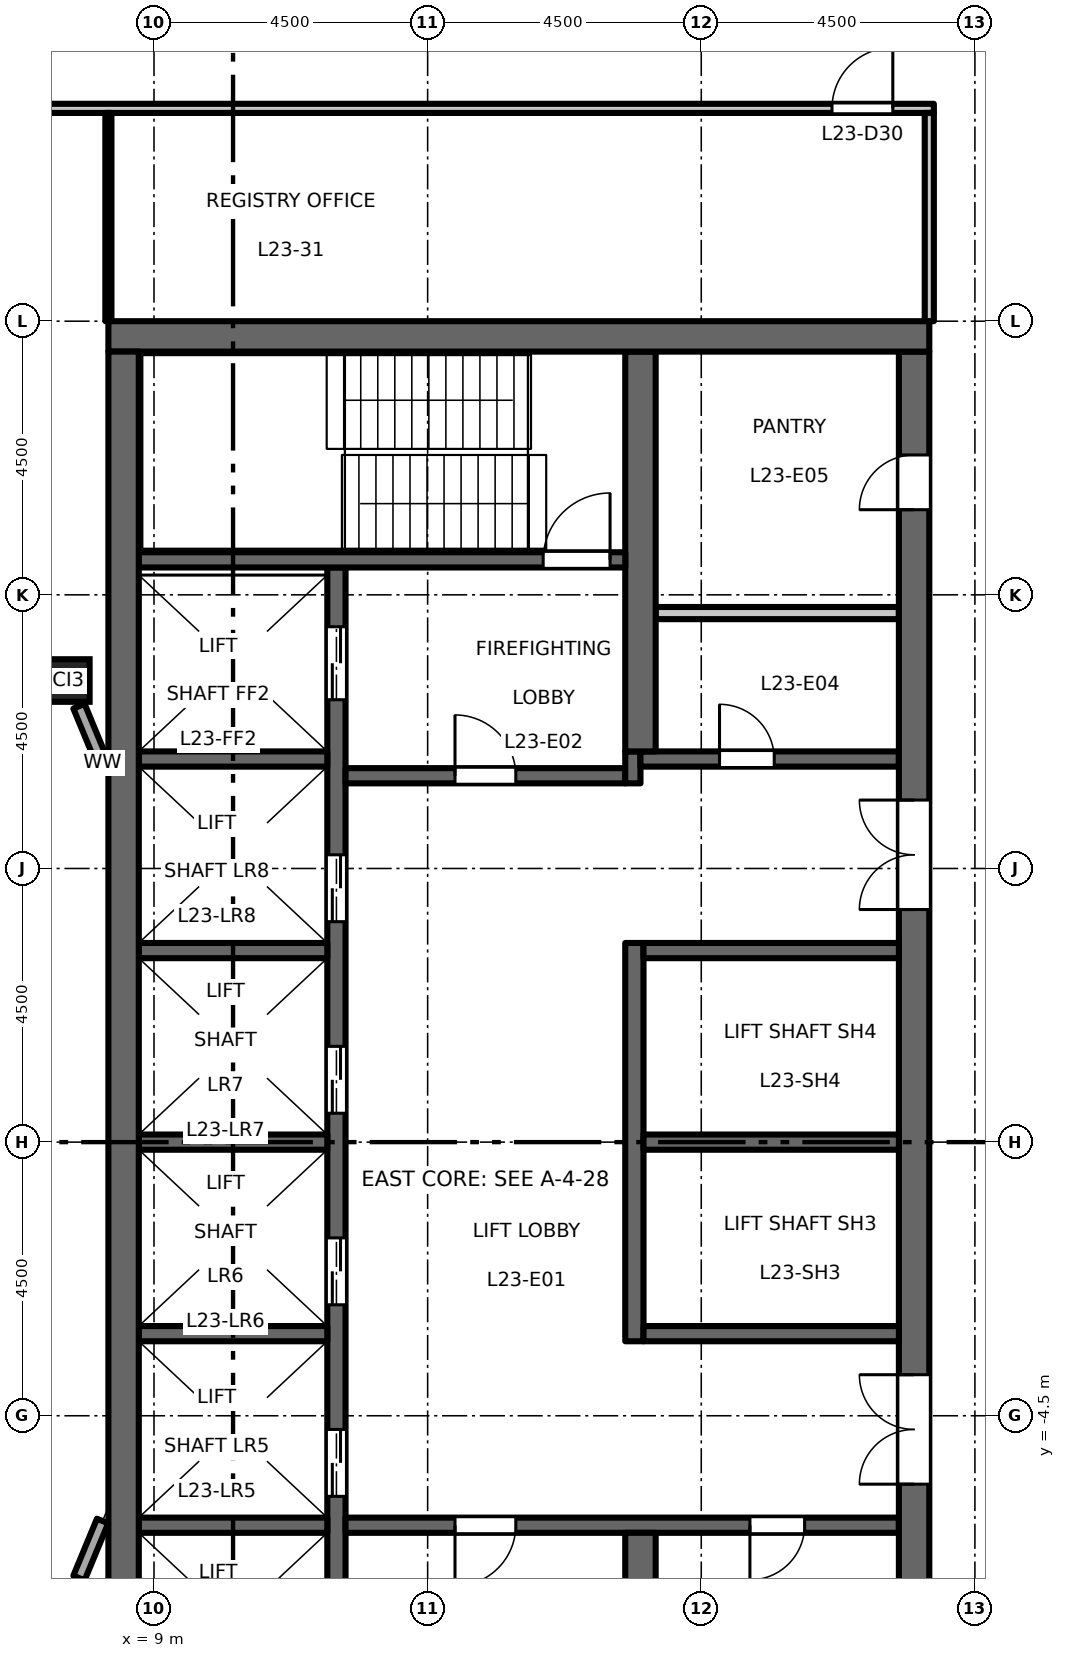
"""IFC4 building model, lengths in metres.
Left out: names, types, materials, properties, quantities, classifications, styles, units other than length and angle.
Written with IfcOpenShell. Run it as: python <this file> out.ifc"""

import sys

from ifc_helpers import new_model, si_unit, direction, frame, frame_2d, origin, origin_2d, place, context, subcontext, project, spatial, rectangle, hollow_rectangle, extrude, element, fill, save


model = new_model("IFC4")
c1 = context("Model", 3, precision=1e-05, world=origin(), true_north=direction((0.0, 1.0)))
c2 = subcontext(c1, "Body", "Model", "MODEL_VIEW")
j1 = project(units=[si_unit("LENGTHUNIT", "METRE"), si_unit("PLANEANGLEUNIT", "RADIAN")], contexts=[c1])
p1 = place(None, origin())
s1 = spatial("IfcSite", under=j1, at=p1, CompositionType="ELEMENT")
p2 = place(p1, origin())
s2 = spatial("IfcBuilding", under=s1, at=p2, CompositionType="ELEMENT")
p3 = place(p2, frame((0.0, 0.0, 109.2)))
s3 = spatial("IfcBuildingStorey", under=s2, at=p3, CompositionType="ELEMENT", Elevation=109.2)
p4 = place(p3, frame((7.591, 7.591, 0.0), z_axis=(0.0, 0.0, 1.0), x_axis=(1.0, 0.0, 0.0)))
e1 = element("IfcColumn", 1, at=p4, inside=s3, PredefinedType="COLUMN", context=c2, shape_type="SweptSolid", body=[
    extrude(hollow_rectangle(XDim=0.7, YDim=0.7, WallThickness=0.04, at=origin_2d()), origin(), (0.0, 0.0, 1.0), 4.5),
])
p5 = place(p3, frame((12.0, -9.45, 0.0), z_axis=(0.0, 0.0, 1.0), x_axis=(0.0, 1.0, 0.0)))
e2 = element("IfcWall", 2, at=p5, inside=s3, PredefinedType="SHEAR", context=c2, shape_type="SweptSolid", body=[
    extrude(rectangle(XDim=18.9, YDim=0.3, at=frame_2d((9.45, 0.0))), origin(), (0.0, 0.0, 1.0), 4.35),
])
p6 = place(p5, frame((3.625, 0.0, 0.0)))
e3 = element("IfcOpeningElement", 3, at=p6, cuts=e2, PredefinedType="OPENING", context=c2, shape_type="SweptSolid", body=[
    extrude(rectangle(XDim=1.1, YDim=2.1, at=frame_2d((0.55, 1.05))), frame((0.0, 0.16, 0.0), z_axis=(0.0, -1.0, 0.0), x_axis=(1.0, 0.0, 0.0)), (0.0, 0.0, 1.0), 0.32),
])
p7 = place(p5, frame((6.775, 0.0, 0.0)))
e4 = element("IfcOpeningElement", 4, at=p7, cuts=e2, PredefinedType="OPENING", context=c2, shape_type="SweptSolid", body=[
    extrude(rectangle(XDim=1.1, YDim=2.1, at=frame_2d((0.55, 1.05))), frame((0.0, 0.16, 0.0), z_axis=(0.0, -1.0, 0.0), x_axis=(1.0, 0.0, 0.0)), (0.0, 0.0, 1.0), 0.32),
])
p8 = place(p5, frame((9.925, 0.0, 0.0)))
e5 = element("IfcOpeningElement", 5, at=p8, cuts=e2, PredefinedType="OPENING", context=c2, shape_type="SweptSolid", body=[
    extrude(rectangle(XDim=1.1, YDim=2.1, at=frame_2d((0.55, 1.05))), frame((0.0, 0.16, 0.0), z_axis=(0.0, -1.0, 0.0), x_axis=(1.0, 0.0, 0.0)), (0.0, 0.0, 1.0), 0.32),
])
p9 = place(p5, frame((13.075, 0.0, 0.0)))
e6 = element("IfcOpeningElement", 6, at=p9, cuts=e2, PredefinedType="OPENING", context=c2, shape_type="SweptSolid", body=[
    extrude(rectangle(XDim=1.1, YDim=2.1, at=frame_2d((0.55, 1.05))), frame((0.0, 0.16, 0.0), z_axis=(0.0, -1.0, 0.0), x_axis=(1.0, 0.0, 0.0)), (0.0, 0.0, 1.0), 0.32),
])
p10 = place(p5, frame((16.725, 0.0, 0.0)))
e7 = element("IfcOpeningElement", 7, at=p10, cuts=e2, PredefinedType="OPENING", context=c2, shape_type="SweptSolid", body=[
    extrude(rectangle(XDim=1.2, YDim=2.1, at=frame_2d((0.6, 1.05))), frame((0.0, 0.16, 0.0), z_axis=(0.0, -1.0, 0.0), x_axis=(1.0, 0.0, 0.0)), (0.0, 0.0, 1.0), 0.32),
])
p11 = place(p5, frame((0.975, 0.0, 0.0)))
e8 = element("IfcOpeningElement", 8, at=p11, cuts=e2, PredefinedType="OPENING", context=c2, shape_type="SweptSolid", body=[
    extrude(rectangle(XDim=1.2, YDim=2.1, at=frame_2d((0.6, 1.05))), frame((0.0, 0.16, 0.0), z_axis=(0.0, -1.0, 0.0), x_axis=(1.0, 0.0, 0.0)), (0.0, 0.0, 1.0), 0.32),
])
p12 = place(p3, frame((12.15, 6.025, 0.0), z_axis=(0.0, 0.0, 1.0), x_axis=(1.0, 0.0, 0.0)))
e9 = element("IfcWall", 9, at=p12, inside=s3, PredefinedType="SHEAR", context=c2, shape_type="SweptSolid", body=[
    extrude(rectangle(XDim=4.6, YDim=0.25, at=frame_2d((2.3, 0.0))), origin(), (0.0, 0.0, 1.0), 4.35),
])
p13 = place(p12, frame((1.8, 0.0, 0.0)))
e10 = element("IfcOpeningElement", 10, at=p13, cuts=e9, PredefinedType="OPENING", context=c2, shape_type="SweptSolid", body=[
    extrude(rectangle(XDim=1.0, YDim=2.1, at=frame_2d((0.5, 1.05))), frame((0.0, 0.135, 0.0), z_axis=(0.0, -1.0, 0.0), x_axis=(1.0, 0.0, 0.0)), (0.0, 0.0, 1.0), 0.27),
])
p14 = place(p3, frame((16.875, 5.9, 0.0), z_axis=(0.0, 0.0, 1.0), x_axis=(0.0, 1.0, 0.0)))
e11 = element("IfcWall", 11, at=p14, inside=s3, PredefinedType="SHEAR", context=c2, shape_type="SweptSolid", body=[
    extrude(rectangle(XDim=0.525, YDim=0.25, at=frame_2d((0.263, 0.0))), origin(), (0.0, 0.0, 1.0), 4.35),
])
p15 = place(p3, frame((17.0, 6.3, 0.0), z_axis=(0.0, 0.0, 1.0), x_axis=(1.0, 0.0, 0.0)))
e12 = element("IfcWall", 12, at=p15, inside=s3, PredefinedType="SHEAR", context=c2, shape_type="SweptSolid", body=[
    extrude(rectangle(XDim=4.25, YDim=0.25, at=frame_2d((2.125, 0.0))), origin(), (0.0, 0.0, 1.0), 4.35),
])
p16 = place(p15, frame((1.3, 0.0, 0.0)))
e13 = element("IfcOpeningElement", 13, at=p16, cuts=e12, PredefinedType="OPENING", context=c2, shape_type="SweptSolid", body=[
    extrude(rectangle(XDim=0.9, YDim=2.1, at=frame_2d((0.45, 1.05))), frame((0.0, 0.135, 0.0), z_axis=(0.0, -1.0, 0.0), x_axis=(1.0, 0.0, 0.0)), (0.0, 0.0, 1.0), 0.27),
])
p17 = place(p3, frame((12.15, -6.3, 0.0), z_axis=(0.0, 0.0, 1.0), x_axis=(1.0, 0.0, 0.0)))
e14 = element("IfcWall", 14, at=p17, inside=s3, PredefinedType="SHEAR", context=c2, shape_type="SweptSolid", body=[
    extrude(rectangle(XDim=9.1, YDim=0.25, at=frame_2d((4.55, 0.0))), origin(), (0.0, 0.0, 1.0), 4.35),
])
p18 = place(p17, frame((1.8, 0.0, 0.0)))
e15 = element("IfcOpeningElement", 15, at=p18, cuts=e14, PredefinedType="OPENING", context=c2, shape_type="SweptSolid", body=[
    extrude(rectangle(XDim=1.0, YDim=2.1, at=frame_2d((0.5, 1.05))), frame((0.0, 0.135, 0.0), z_axis=(0.0, -1.0, 0.0), x_axis=(1.0, 0.0, 0.0)), (0.0, 0.0, 1.0), 0.27),
])
p19 = place(p17, frame((6.65, 0.0, 0.0)))
e16 = element("IfcOpeningElement", 16, at=p19, cuts=e14, PredefinedType="OPENING", context=c2, shape_type="SweptSolid", body=[
    extrude(rectangle(XDim=0.9, YDim=2.1, at=frame_2d((0.45, 1.05))), frame((0.0, 0.135, 0.0), z_axis=(0.0, -1.0, 0.0), x_axis=(1.0, 0.0, 0.0)), (0.0, 0.0, 1.0), 0.27),
])
p20 = place(p3, frame((21.5, -13.0, 0.0), z_axis=(0.0, 0.0, 1.0), x_axis=(0.0, 1.0, 0.0)))
e17 = element("IfcWall", 17, at=p20, inside=s3, PredefinedType="SHEAR", context=c2, shape_type="SweptSolid", body=[
    extrude(rectangle(XDim=26.0, YDim=0.5, at=frame_2d((13.0, 0.0))), origin(), (0.0, 0.0, 1.0), 4.35),
])
p21 = place(p20, frame((16.825, 0.0, 0.0)))
e18 = element("IfcOpeningElement", 18, at=p21, cuts=e17, PredefinedType="OPENING", context=c2, shape_type="SweptSolid", body=[
    extrude(rectangle(XDim=1.8, YDim=2.1, at=frame_2d((0.9, 1.05))), frame((0.0, 0.26, 0.0), z_axis=(0.0, -1.0, 0.0), x_axis=(1.0, 0.0, 0.0)), (0.0, 0.0, 1.0), 0.52),
])
p22 = place(p20, frame((7.375, 0.0, 0.0)))
e19 = element("IfcOpeningElement", 19, at=p22, cuts=e17, PredefinedType="OPENING", context=c2, shape_type="SweptSolid", body=[
    extrude(rectangle(XDim=1.8, YDim=2.1, at=frame_2d((0.9, 1.05))), frame((0.0, 0.26, 0.0), z_axis=(0.0, -1.0, 0.0), x_axis=(1.0, 0.0, 0.0)), (0.0, 0.0, 1.0), 0.52),
])
p23 = place(p20, frame((23.4, 0.0, 0.0)))
e20 = element("IfcOpeningElement", 20, at=p23, cuts=e17, PredefinedType="OPENING", context=c2, shape_type="SweptSolid", body=[
    extrude(rectangle(XDim=0.9, YDim=2.1, at=frame_2d((0.45, 1.05))), frame((0.0, 0.26, 0.0), z_axis=(0.0, -1.0, 0.0), x_axis=(1.0, 0.0, 0.0)), (0.0, 0.0, 1.0), 0.52),
])
p24 = place(p3, frame((17.25, 8.7, 0.0), z_axis=(0.0, 0.0, 1.0), x_axis=(1.0, 0.0, 0.0)))
e21 = element("IfcWall", 21, at=p24, inside=s3, PredefinedType="PARTITIONING", context=c2, shape_type="SweptSolid", body=[
    extrude(rectangle(XDim=4.0, YDim=0.2, at=frame_2d((2.0, 0.0))), origin(), (0.0, 0.0, 1.0), 4.35),
])
p25 = place(p3, frame((16.9, -3.275, 0.0), z_axis=(0.0, 0.0, 1.0), x_axis=(0.0, 1.0, 0.0)))
e22 = element("IfcWall", 22, at=p25, inside=s3, PredefinedType="SHEAR", context=c2, shape_type="SweptSolid", body=[
    extrude(rectangle(XDim=6.55, YDim=0.3, at=frame_2d((3.275, 0.0))), origin(), (0.0, 0.0, 1.0), 4.35),
])
for number, where, z_axis, x_axis in (
    (23, (17.05, 0.0, 0.0), (0.0, 0.0, 1.0), (1.0, 0.0, 0.0)),
    (24, (17.05, 3.15, 0.0), (0.0, 0.0, 1.0), (1.0, 0.0, 0.0)),
    (25, (17.05, -3.15, 0.0), (0.0, 0.0, 1.0), (1.0, 0.0, 0.0)),
):
    element("IfcWall", number, at=place(p3, frame(where, z_axis=z_axis, x_axis=x_axis)), inside=s3, PredefinedType="SHEAR", context=c2, shape_type="SweptSolid", body=[
        extrude(rectangle(XDim=4.2, YDim=0.25, at=frame_2d((2.1, 0.0))), origin(), (0.0, 0.0, 1.0), 4.35),
    ])
for number, where, z_axis, x_axis in (
    (26, (17.0, 6.425, 0.0), (0.0, 0.0, 1.0), (0.0, 1.0, 0.0)),
    (27, (17.0, -13.0, 0.0), (0.0, 0.0, 1.0), (0.0, 1.0, 0.0)),
):
    element("IfcWall", number, at=place(p3, frame(where, z_axis=z_axis, x_axis=x_axis)), inside=s3, PredefinedType="SHEAR", context=c2, shape_type="SweptSolid", body=[
        extrude(rectangle(XDim=6.575, YDim=0.5, at=frame_2d((3.288, 0.0))), origin(), (0.0, 0.0, 1.0), 4.35),
    ])
for number, where, z_axis, x_axis in (
    (28, (8.75, 0.0, 0.0), (0.0, 0.0, 1.0), (1.0, 0.0, 0.0)),
    (29, (8.75, 3.15, 0.0), (0.0, 0.0, 1.0), (1.0, 0.0, 0.0)),
    (30, (8.75, 6.3, 0.0), (0.0, 0.0, 1.0), (1.0, 0.0, 0.0)),
    (31, (8.75, -3.15, 0.0), (0.0, 0.0, 1.0), (1.0, 0.0, 0.0)),
    (32, (8.75, -6.3, 0.0), (0.0, 0.0, 1.0), (1.0, 0.0, 0.0)),
):
    element("IfcWall", number, at=place(p3, frame(where, z_axis=z_axis, x_axis=x_axis)), inside=s3, PredefinedType="SHEAR", context=c2, shape_type="SweptSolid", body=[
        extrude(rectangle(XDim=3.1, YDim=0.25, at=frame_2d((1.55, 0.0))), origin(), (0.0, 0.0, 1.0), 4.35),
    ])
p26 = place(p3, frame((8.75, 9.575, 0.0), z_axis=(0.0, 0.0, 1.0), x_axis=(1.0, 0.0, 0.0)))
e33 = element("IfcWall", 33, at=p26, inside=s3, PredefinedType="SHEAR", context=c2, shape_type="SweptSolid", body=[
    extrude(rectangle(XDim=8.0, YDim=0.25, at=frame_2d((4.0, 0.0))), origin(), (0.0, 0.0, 1.0), 4.35),
])
p27 = place(p26, frame((6.65, 0.0, 0.0)))
e34 = element("IfcOpeningElement", 34, at=p27, cuts=e33, PredefinedType="OPENING", context=c2, shape_type="SweptSolid", body=[
    extrude(rectangle(XDim=1.1, YDim=2.1, at=frame_2d((0.55, 1.05))), frame((0.0, 0.135, 0.0), z_axis=(0.0, -1.0, 0.0), x_axis=(1.0, 0.0, 0.0)), (0.0, 0.0, 1.0), 0.27),
])
p28 = place(p3, frame((8.25, 13.25, 0.0), z_axis=(0.0, 0.0, 1.0), x_axis=(1.0, 0.0, 0.0)))
e35 = element("IfcWall", 35, at=p28, inside=s3, PredefinedType="SHEAR", context=c2, shape_type="SweptSolid", body=[
    extrude(rectangle(XDim=13.5, YDim=0.5, at=frame_2d((6.75, 0.0))), origin(), (0.0, 0.0, 1.0), 4.35),
])
p29 = place(p3, frame((8.5, -13.0, 0.0), z_axis=(0.0, 0.0, 1.0), x_axis=(0.0, 1.0, 0.0)))
e36 = element("IfcWall", 36, at=p29, inside=s3, PredefinedType="SHEAR", context=c2, shape_type="SweptSolid", body=[
    extrude(rectangle(XDim=26.0, YDim=0.5, at=frame_2d((13.0, 0.0))), origin(), (0.0, 0.0, 1.0), 4.35),
])
for number, where, z_axis, x_axis in (
    (37, (7.766, -7.168, 0.0), (0.0, 0.0, 1.0), (0.383, 0.924, 0.0)),
    (38, (8.154, 6.231, 0.0), (0.0, 0.0, 1.0), (-0.383, 0.924, 0.0)),
):
    element("IfcWall", number, at=place(p3, frame(where, z_axis=z_axis, x_axis=x_axis)), inside=s3, PredefinedType="STANDARD", context=c2, shape_type="SweptSolid", body=[
        extrude(rectangle(XDim=1.015, YDim=0.2, at=frame_2d((0.507, 0.0))), origin(), (0.0, 0.0, 1.0), 3.826),
    ])
p30 = place(p3, frame((-21.825, 17.0, 0.0), z_axis=(0.0, 0.0, 1.0), x_axis=(1.0, 0.0, 0.0)))
e39 = element("IfcWall", 39, at=p30, inside=s3, PredefinedType="PARTITIONING", context=c2, shape_type="SweptSolid", body=[
    extrude(rectangle(XDim=43.65, YDim=0.15, at=frame_2d((21.825, 0.0))), origin(), (0.0, 0.0, 1.0), 4.35),
])
p31 = place(p30, frame((20.225, 0.0, 0.0)))
e40 = element("IfcOpeningElement", 40, at=p31, cuts=e39, PredefinedType="OPENING", context=c2, shape_type="SweptSolid", body=[
    extrude(rectangle(XDim=1.0, YDim=2.1, at=frame_2d((0.5, 1.05))), frame((0.0, 0.085, 0.0), z_axis=(0.0, -1.0, 0.0), x_axis=(1.0, 0.0, 0.0)), (0.0, 0.0, 1.0), 0.17),
])
p32 = place(p30, frame((22.475, 0.0, 0.0)))
e41 = element("IfcOpeningElement", 41, at=p32, cuts=e39, PredefinedType="OPENING", context=c2, shape_type="SweptSolid", body=[
    extrude(rectangle(XDim=1.0, YDim=2.1, at=frame_2d((0.5, 1.05))), frame((0.0, 0.085, 0.0), z_axis=(0.0, -1.0, 0.0), x_axis=(1.0, 0.0, 0.0)), (0.0, 0.0, 1.0), 0.17),
])
p33 = place(p30, frame((0.725, 0.0, 0.0)))
e42 = element("IfcOpeningElement", 42, at=p33, cuts=e39, PredefinedType="OPENING", context=c2, shape_type="SweptSolid", body=[
    extrude(rectangle(XDim=1.0, YDim=2.1, at=frame_2d((0.5, 1.05))), frame((0.0, 0.085, 0.0), z_axis=(0.0, -1.0, 0.0), x_axis=(1.0, 0.0, 0.0)), (0.0, 0.0, 1.0), 0.17),
])
p34 = place(p30, frame((41.975, 0.0, 0.0)))
e43 = element("IfcOpeningElement", 43, at=p34, cuts=e39, PredefinedType="OPENING", context=c2, shape_type="SweptSolid", body=[
    extrude(rectangle(XDim=1.0, YDim=2.1, at=frame_2d((0.5, 1.05))), frame((0.0, 0.085, 0.0), z_axis=(0.0, -1.0, 0.0), x_axis=(1.0, 0.0, 0.0)), (0.0, 0.0, 1.0), 0.17),
])
p35 = place(p3, frame((8.25, 13.5, 0.0), z_axis=(0.0, 0.0, 1.0), x_axis=(0.0, 1.0, 0.0)))
e44 = element("IfcWall", 44, at=p35, inside=s3, PredefinedType="PARTITIONING", context=c2, shape_type="SweptSolid", body=[
    extrude(rectangle(XDim=3.425, YDim=0.1, at=frame_2d((1.712, 0.0))), origin(), (0.0, 0.0, 1.0), 4.35),
])
p36 = place(p3, frame((21.75, 13.5, 0.0), z_axis=(0.0, 0.0, 1.0), x_axis=(0.0, 1.0, 0.0)))
e45 = element("IfcWall", 45, at=p36, inside=s3, PredefinedType="PARTITIONING", context=c2, shape_type="SweptSolid", body=[
    extrude(rectangle(XDim=3.425, YDim=0.15, at=frame_2d((1.712, 0.0))), origin(), (0.0, 0.0, 1.0), 4.35),
])
p37 = place(p13, origin())
e46 = element("IfcDoor", 46, at=p37, inside=s3, OperationType="SINGLE_SWING_RIGHT", PredefinedType="DOOR", context=c2, shape_type="SweptSolid", body=[
    extrude(rectangle(XDim=1.0, YDim=2.1, at=frame_2d((0.5, 1.05))), frame((0.0, 0.025, 0.0), z_axis=(0.0, -1.0, 0.0), x_axis=(1.0, 0.0, 0.0)), (0.0, 0.0, 1.0), 0.05),
])
fill(e10, e46)
p38 = place(p18, origin())
e47 = element("IfcDoor", 47, at=p38, inside=s3, OperationType="SINGLE_SWING_LEFT", PredefinedType="DOOR", context=c2, shape_type="SweptSolid", body=[
    extrude(rectangle(XDim=1.0, YDim=2.1, at=frame_2d((0.5, 1.05))), frame((0.0, 0.025, 0.0), z_axis=(0.0, -1.0, 0.0), x_axis=(1.0, 0.0, 0.0)), (0.0, 0.0, 1.0), 0.05),
])
fill(e15, e47)
p39 = place(p27, origin())
e48 = element("IfcDoor", 48, at=p39, inside=s3, OperationType="SINGLE_SWING_LEFT", PredefinedType="DOOR", context=c2, shape_type="SweptSolid", body=[
    extrude(rectangle(XDim=1.1, YDim=2.1, at=frame_2d((0.55, 1.05))), frame((0.0, 0.025, 0.0), z_axis=(0.0, -1.0, 0.0), x_axis=(1.0, 0.0, 0.0)), (0.0, 0.0, 1.0), 0.05),
])
fill(e34, e48)
p40 = place(p21, origin())
e49 = element("IfcDoor", 49, at=p40, inside=s3, OperationType="DOUBLE_DOOR_DOUBLE_SWING", PredefinedType="DOOR", context=c2, shape_type="SweptSolid", body=[
    extrude(rectangle(XDim=1.8, YDim=2.1, at=frame_2d((0.9, 1.05))), frame((0.0, 0.025, 0.0), z_axis=(0.0, -1.0, 0.0), x_axis=(1.0, 0.0, 0.0)), (0.0, 0.0, 1.0), 0.05),
])
fill(e18, e49)
p41 = place(p22, origin())
e50 = element("IfcDoor", 50, at=p41, inside=s3, OperationType="DOUBLE_DOOR_DOUBLE_SWING", PredefinedType="DOOR", context=c2, shape_type="SweptSolid", body=[
    extrude(rectangle(XDim=1.8, YDim=2.1, at=frame_2d((0.9, 1.05))), frame((0.0, 0.025, 0.0), z_axis=(0.0, -1.0, 0.0), x_axis=(1.0, 0.0, 0.0)), (0.0, 0.0, 1.0), 0.05),
])
fill(e19, e50)
p42 = place(p6, origin())
e51 = element("IfcDoor", 51, at=p42, inside=s3, OperationType="DOUBLE_DOOR_SLIDING", PredefinedType="DOOR", context=c2, shape_type="SweptSolid", body=[
    extrude(rectangle(XDim=1.1, YDim=2.1, at=frame_2d((0.55, 1.05))), frame((0.0, 0.025, 0.0), z_axis=(0.0, -1.0, 0.0), x_axis=(1.0, 0.0, 0.0)), (0.0, 0.0, 1.0), 0.05),
])
fill(e3, e51)
p43 = place(p7, origin())
e52 = element("IfcDoor", 52, at=p43, inside=s3, OperationType="DOUBLE_DOOR_SLIDING", PredefinedType="DOOR", context=c2, shape_type="SweptSolid", body=[
    extrude(rectangle(XDim=1.1, YDim=2.1, at=frame_2d((0.55, 1.05))), frame((0.0, 0.025, 0.0), z_axis=(0.0, -1.0, 0.0), x_axis=(1.0, 0.0, 0.0)), (0.0, 0.0, 1.0), 0.05),
])
fill(e4, e52)
p44 = place(p8, origin())
e53 = element("IfcDoor", 53, at=p44, inside=s3, OperationType="DOUBLE_DOOR_SLIDING", PredefinedType="DOOR", context=c2, shape_type="SweptSolid", body=[
    extrude(rectangle(XDim=1.1, YDim=2.1, at=frame_2d((0.55, 1.05))), frame((0.0, 0.025, 0.0), z_axis=(0.0, -1.0, 0.0), x_axis=(1.0, 0.0, 0.0)), (0.0, 0.0, 1.0), 0.05),
])
fill(e5, e53)
p45 = place(p9, origin())
e54 = element("IfcDoor", 54, at=p45, inside=s3, OperationType="DOUBLE_DOOR_SLIDING", PredefinedType="DOOR", context=c2, shape_type="SweptSolid", body=[
    extrude(rectangle(XDim=1.1, YDim=2.1, at=frame_2d((0.55, 1.05))), frame((0.0, 0.025, 0.0), z_axis=(0.0, -1.0, 0.0), x_axis=(1.0, 0.0, 0.0)), (0.0, 0.0, 1.0), 0.05),
])
fill(e6, e54)
p46 = place(p10, origin())
e55 = element("IfcDoor", 55, at=p46, inside=s3, OperationType="DOUBLE_DOOR_SLIDING", PredefinedType="DOOR", context=c2, shape_type="SweptSolid", body=[
    extrude(rectangle(XDim=1.2, YDim=2.1, at=frame_2d((0.6, 1.05))), frame((0.0, 0.025, 0.0), z_axis=(0.0, -1.0, 0.0), x_axis=(1.0, 0.0, 0.0)), (0.0, 0.0, 1.0), 0.05),
])
fill(e7, e55)
p47 = place(p16, origin())
e56 = element("IfcDoor", 56, at=p47, inside=s3, OperationType="SINGLE_SWING_RIGHT", PredefinedType="DOOR", context=c2, shape_type="SweptSolid", body=[
    extrude(rectangle(XDim=0.9, YDim=2.1, at=frame_2d((0.45, 1.05))), frame((0.0, 0.025, 0.0), z_axis=(0.0, -1.0, 0.0), x_axis=(1.0, 0.0, 0.0)), (0.0, 0.0, 1.0), 0.05),
])
fill(e13, e56)
p48 = place(p23, origin())
e57 = element("IfcDoor", 57, at=p48, inside=s3, OperationType="SINGLE_SWING_RIGHT", PredefinedType="DOOR", context=c2, shape_type="SweptSolid", body=[
    extrude(rectangle(XDim=0.9, YDim=2.1, at=frame_2d((0.45, 1.05))), frame((0.0, 0.025, 0.0), z_axis=(0.0, -1.0, 0.0), x_axis=(1.0, 0.0, 0.0)), (0.0, 0.0, 1.0), 0.05),
])
fill(e20, e57)
p49 = place(p19, origin())
e58 = element("IfcDoor", 58, at=p49, inside=s3, OperationType="SINGLE_SWING_LEFT", PredefinedType="DOOR", context=c2, shape_type="SweptSolid", body=[
    extrude(rectangle(XDim=0.9, YDim=2.1, at=frame_2d((0.45, 1.05))), frame((0.0, 0.025, 0.0), z_axis=(0.0, -1.0, 0.0), x_axis=(1.0, 0.0, 0.0)), (0.0, 0.0, 1.0), 0.05),
])
fill(e16, e58)
p50 = place(p34, origin())
e59 = element("IfcDoor", 59, at=p50, inside=s3, OperationType="SINGLE_SWING_RIGHT", PredefinedType="DOOR", context=c2, shape_type="SweptSolid", body=[
    extrude(rectangle(XDim=1.0, YDim=2.1, at=frame_2d((0.5, 1.05))), frame((0.0, 0.025, 0.0), z_axis=(0.0, -1.0, 0.0), x_axis=(1.0, 0.0, 0.0)), (0.0, 0.0, 1.0), 0.05),
])
fill(e43, e59)
save(model, sys.argv[1])
